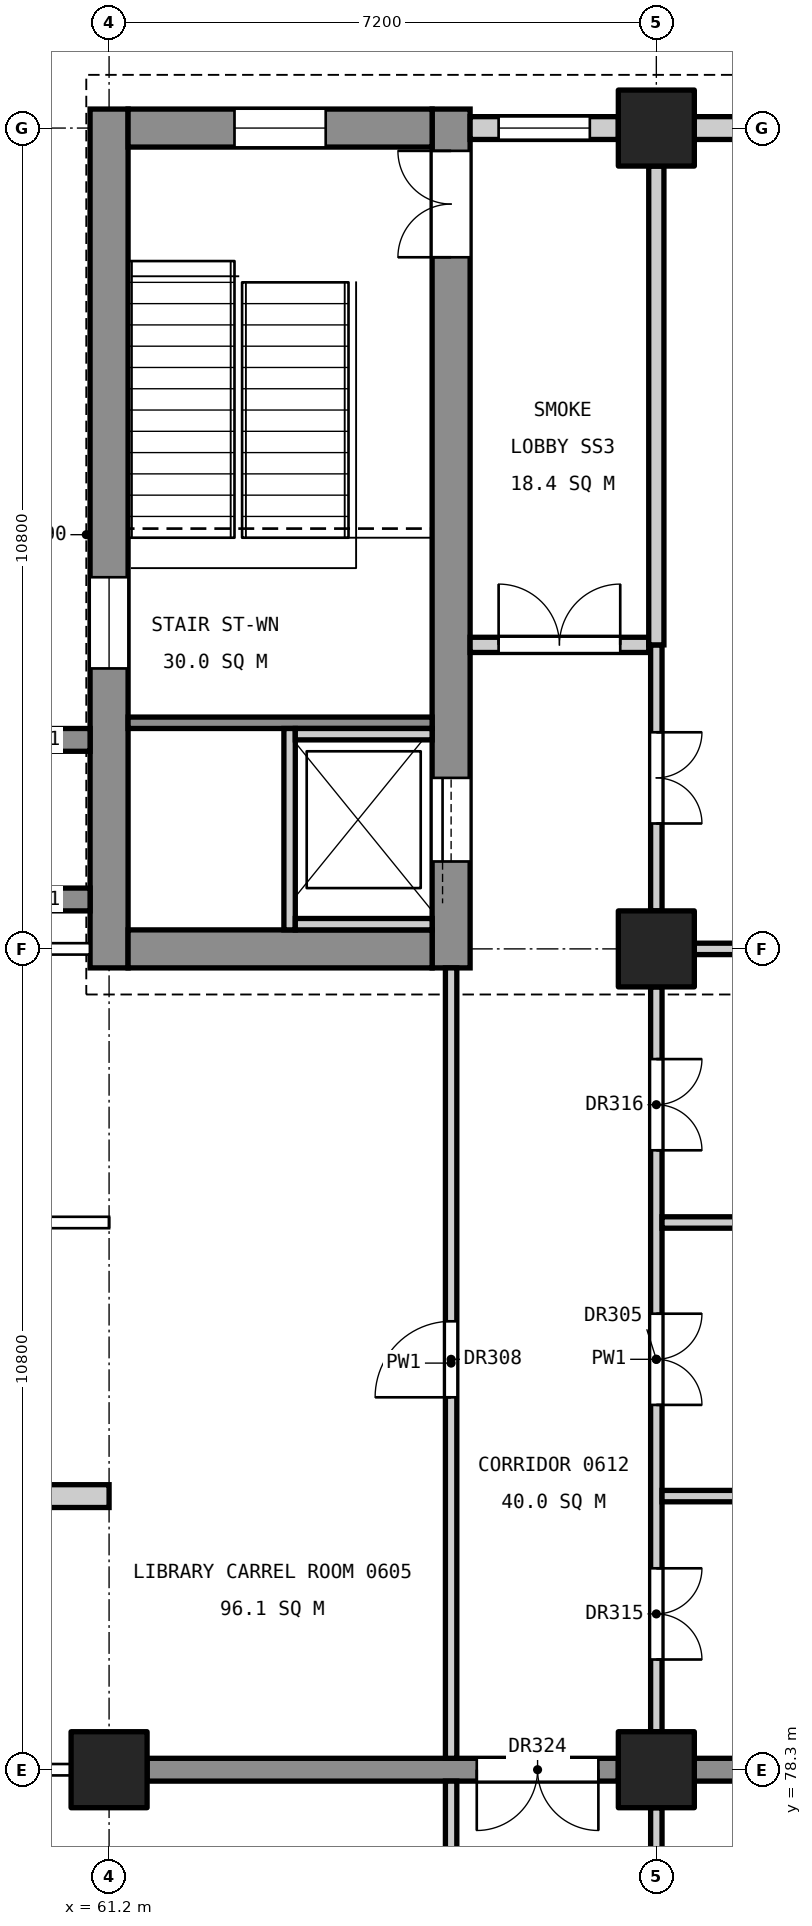
"""IFC4 building model, lengths in metres.
Left out: names, types, materials, properties, quantities, classifications, styles, units other than length and angle.
Written with IfcOpenShell. Run it as: python <this file> out.ifc"""

import sys

from ifc_helpers import new_model, si_unit, direction, frame, frame_2d, origin, origin_2d, place, context, subcontext, project, spatial, rectangle, extrude, element, fill, save


model = new_model("IFC4")
c1 = context("Model", 3, precision=1e-05, world=origin(), true_north=direction((0.0, 1.0)))
c2 = subcontext(c1, "Body", "Model", "MODEL_VIEW")
j1 = project(units=[si_unit("LENGTHUNIT", "METRE"), si_unit("PLANEANGLEUNIT", "RADIAN")], contexts=[c1])
p1 = place(None, origin())
s1 = spatial("IfcSite", under=j1, at=p1, CompositionType="ELEMENT")
p2 = place(p1, origin())
s2 = spatial("IfcBuilding", under=s1, at=p2, CompositionType="ELEMENT")
p3 = place(p2, frame((0.0, 0.0, 31.8)))
s3 = spatial("IfcBuildingStorey", under=s2, at=p3, CompositionType="ELEMENT", Elevation=31.8)
for number, where, z_axis, x_axis in (
    (1, (61.2, 78.3, 0.0), (0.0, 0.0, 1.0), (1.0, 0.0, 0.0)),
    (2, (68.4, 78.3, 0.0), (0.0, 0.0, 1.0), (1.0, 0.0, 0.0)),
    (3, (68.4, 89.1, 0.0), (0.0, 0.0, 1.0), (1.0, 0.0, 0.0)),
    (4, (68.4, 99.9, 0.0), (0.0, 0.0, 1.0), (1.0, 0.0, 0.0)),
):
    element("IfcColumn", number, at=place(p3, frame(where, z_axis=z_axis, x_axis=x_axis)), inside=s3, PredefinedType="COLUMN", context=c2, shape_type="SweptSolid", body=[
        extrude(rectangle(XDim=1.0, YDim=1.0, at=origin_2d()), origin(), (0.0, 0.0, 1.0), 4.8),
    ])
p4 = place(p3, frame((61.2, 88.85, 0.0), z_axis=(0.0, 0.0, 1.0), x_axis=(0.0, 1.0, 0.0)))
e5 = element("IfcWall", 5, at=p4, inside=s3, PredefinedType="SHEAR", context=c2, shape_type="SweptSolid", body=[
    extrude(rectangle(XDim=11.3, YDim=0.5, at=frame_2d((5.65, 0.0))), origin(), (0.0, 0.0, 1.0), 4.55),
])
p5 = place(p4, frame((3.94, 0.0, 3.4)))
e6 = element("IfcOpeningElement", 6, at=p5, cuts=e5, PredefinedType="OPENING", context=c2, shape_type="SweptSolid", body=[
    extrude(rectangle(XDim=1.2, YDim=0.9, at=frame_2d((0.6, 0.45))), frame((0.0, 0.26, 0.0), z_axis=(0.0, -1.0, 0.0), x_axis=(1.0, 0.0, 0.0)), (0.0, 0.0, 1.0), 0.52),
])
p6 = place(p3, frame((65.7, 88.85, 0.0), z_axis=(0.0, 0.0, 1.0), x_axis=(0.0, 1.0, 0.0)))
e7 = element("IfcWall", 7, at=p6, inside=s3, PredefinedType="SHEAR", context=c2, shape_type="SweptSolid", body=[
    extrude(rectangle(XDim=11.3, YDim=0.5, at=frame_2d((5.65, 0.0))), origin(), (0.0, 0.0, 1.0), 4.55),
])
p7 = place(p6, frame((9.35, 0.0, 0.0)))
e8 = element("IfcOpeningElement", 8, at=p7, cuts=e7, PredefinedType="OPENING", context=c2, shape_type="SweptSolid", body=[
    extrude(rectangle(XDim=1.4, YDim=2.1, at=frame_2d((0.7, 1.05))), frame((0.0, 0.26, 0.0), z_axis=(0.0, -1.0, 0.0), x_axis=(1.0, 0.0, 0.0)), (0.0, 0.0, 1.0), 0.52),
])
p8 = place(p6, frame((1.4, 0.0, 0.0)))
e9 = element("IfcOpeningElement", 9, at=p8, cuts=e7, PredefinedType="OPENING", context=c2, shape_type="SweptSolid", body=[
    extrude(rectangle(XDim=1.1, YDim=2.1, at=frame_2d((0.55, 1.05))), frame((0.0, 0.26, 0.0), z_axis=(0.0, -1.0, 0.0), x_axis=(1.0, 0.0, 0.0)), (0.0, 0.0, 1.0), 0.52),
])
p9 = place(p3, frame((61.45, 89.1, 0.0), z_axis=(0.0, 0.0, 1.0), x_axis=(1.0, 0.0, 0.0)))
e10 = element("IfcWall", 10, at=p9, inside=s3, PredefinedType="SHEAR", context=c2, shape_type="SweptSolid", body=[
    extrude(rectangle(XDim=4.0, YDim=0.5, at=frame_2d((2.0, 0.0))), origin(), (0.0, 0.0, 1.0), 4.55),
])
p10 = place(p3, frame((61.45, 99.9, 0.0), z_axis=(0.0, 0.0, 1.0), x_axis=(1.0, 0.0, 0.0)))
e11 = element("IfcWall", 11, at=p10, inside=s3, PredefinedType="SHEAR", context=c2, shape_type="SweptSolid", body=[
    extrude(rectangle(XDim=4.0, YDim=0.5, at=frame_2d((2.0, 0.0))), origin(), (0.0, 0.0, 1.0), 4.55),
])
p11 = place(p10, frame((1.4, 0.0, 3.4)))
e12 = element("IfcOpeningElement", 12, at=p11, cuts=e11, PredefinedType="OPENING", context=c2, shape_type="SweptSolid", body=[
    extrude(rectangle(XDim=1.2, YDim=0.9, at=frame_2d((0.6, 0.45))), frame((0.0, 0.26, 0.0), z_axis=(0.0, -1.0, 0.0), x_axis=(1.0, 0.0, 0.0)), (0.0, 0.0, 1.0), 0.52),
])
for number, where, z_axis, x_axis in (
    (13, (60.95, 89.75, 0.0), (0.0, 0.0, 1.0), (-1.0, 0.0, 0.0)),
    (14, (60.95, 91.85, 0.0), (0.0, 0.0, 1.0), (-1.0, 0.0, 0.0)),
):
    element("IfcWall", number, at=place(p3, frame(where, z_axis=z_axis, x_axis=x_axis)), inside=s3, PredefinedType="SHEAR", context=c2, shape_type="SweptSolid", body=[
        extrude(rectangle(XDim=1.25, YDim=0.3, at=frame_2d((0.625, 0.0))), origin(), (0.0, 0.0, 1.0), 4.8),
    ])
p12 = place(p3, frame((61.7, 78.3, 0.0), z_axis=(0.0, 0.0, 1.0), x_axis=(1.0, 0.0, 0.0)))
e15 = element("IfcWall", 15, at=p12, inside=s3, PredefinedType="SHEAR", context=c2, shape_type="SweptSolid", body=[
    extrude(rectangle(XDim=6.2, YDim=0.3, at=frame_2d((3.1, 0.0))), origin(), (0.0, 0.0, 1.0), 4.55),
])
p13 = place(p12, frame((4.337, 0.0, 0.0)))
e16 = element("IfcOpeningElement", 16, at=p13, cuts=e15, PredefinedType="OPENING", context=c2, shape_type="SweptSolid", body=[
    extrude(rectangle(XDim=1.6, YDim=2.1, at=frame_2d((0.8, 1.05))), frame((0.0, 0.16, 0.0), z_axis=(0.0, -1.0, 0.0), x_axis=(1.0, 0.0, 0.0)), (0.0, 0.0, 1.0), 0.32),
])
p14 = place(p3, frame((68.9, 78.3, 0.0), z_axis=(0.0, 0.0, 1.0), x_axis=(1.0, 0.0, 0.0)))
e17 = element("IfcWall", 17, at=p14, inside=s3, PredefinedType="SHEAR", context=c2, shape_type="SweptSolid", body=[
    extrude(rectangle(XDim=9.8, YDim=0.3, at=frame_2d((4.9, 0.0))), origin(), (0.0, 0.0, 1.0), 4.55),
])
p15 = place(p3, frame((61.45, 92.075, 0.0), z_axis=(0.0, 0.0, 1.0), x_axis=(1.0, 0.0, 0.0)))
e18 = element("IfcWall", 18, at=p15, inside=s3, PredefinedType="SOLIDWALL", context=c2, shape_type="SweptSolid", body=[
    extrude(rectangle(XDim=4.0, YDim=0.15, at=frame_2d((2.0, 0.0))), origin(), (0.0, 0.0, 1.0), 4.55),
])
p16 = place(p3, frame((63.575, 92.0, 0.0), z_axis=(0.0, 0.0, 1.0), x_axis=(0.0, -1.0, 0.0)))
e19 = element("IfcWall", 19, at=p16, inside=s3, PredefinedType="SOLIDWALL", context=c2, shape_type="SweptSolid", body=[
    extrude(rectangle(XDim=2.65, YDim=0.15, at=frame_2d((1.325, 0.0))), origin(), (0.0, 0.0, 1.0), 4.8),
])
for number, where, z_axis, x_axis in (
    (20, (63.65, 91.925, 0.0), (0.0, 0.0, 1.0), (1.0, 0.0, 0.0)),
    (21, (63.65, 89.425, 0.0), (0.0, 0.0, 1.0), (1.0, 0.0, 0.0)),
):
    element("IfcWall", number, at=place(p3, frame(where, z_axis=z_axis, x_axis=x_axis)), inside=s3, PredefinedType="SOLIDWALL", context=c2, shape_type="SweptSolid", body=[
        extrude(rectangle(XDim=1.8, YDim=0.15, at=frame_2d((0.9, 0.0))), origin(), (0.0, 0.0, 1.0), 4.8),
    ])
p17 = place(p3, frame((65.95, 99.9, 0.0), z_axis=(0.0, 0.0, 1.0), x_axis=(1.0, 0.0, 0.0)))
e22 = element("IfcWall", 22, at=p17, inside=s3, PredefinedType="STANDARD", context=c2, shape_type="SweptSolid", body=[
    extrude(rectangle(XDim=1.95, YDim=0.3, at=frame_2d((0.975, 0.0))), origin(), (0.0, 0.0, 1.0), 3.85),
])
p18 = place(p17, frame((0.375, 0.0, 0.9)))
e23 = element("IfcOpeningElement", 23, at=p18, cuts=e22, PredefinedType="OPENING", context=c2, shape_type="SweptSolid", body=[
    extrude(rectangle(XDim=1.2, YDim=2.4, at=frame_2d((0.6, 1.2))), frame((0.0, 0.16, 0.0), z_axis=(0.0, -1.0, 0.0), x_axis=(1.0, 0.0, 0.0)), (0.0, 0.0, 1.0), 0.32),
])
p19 = place(p3, frame((68.9, 99.9, 0.0), z_axis=(0.0, 0.0, 1.0), x_axis=(1.0, 0.0, 0.0)))
e24 = element("IfcWall", 24, at=p19, inside=s3, PredefinedType="STANDARD", context=c2, shape_type="SweptSolid", body=[
    extrude(rectangle(XDim=9.8, YDim=0.3, at=frame_2d((4.9, 0.0))), origin(), (0.0, 0.0, 1.0), 3.85),
])
p20 = place(p19, frame((0.65, 0.0, 0.9)))
e25 = element("IfcOpeningElement", 25, at=p20, cuts=e24, PredefinedType="OPENING", context=c2, shape_type="SweptSolid", body=[
    extrude(rectangle(XDim=1.8, YDim=2.4, at=frame_2d((0.9, 1.2))), frame((0.0, 0.16, 0.0), z_axis=(0.0, -1.0, 0.0), x_axis=(1.0, 0.0, 0.0)), (0.0, 0.0, 1.0), 0.32),
])
p21 = place(p19, frame((4.525, 0.0, 0.8)))
e26 = element("IfcOpeningElement", 26, at=p21, cuts=e24, PredefinedType="OPENING", context=c2, shape_type="SweptSolid", body=[
    extrude(rectangle(XDim=0.75, YDim=1.2, at=frame_2d((0.375, 0.6))), frame((0.0, 0.16, 0.0), z_axis=(0.0, -1.0, 0.0), x_axis=(1.0, 0.0, 0.0)), (0.0, 0.0, 1.0), 0.32),
])
p22 = place(p19, frame((7.35, 0.0, 0.9)))
e27 = element("IfcOpeningElement", 27, at=p22, cuts=e24, PredefinedType="OPENING", context=c2, shape_type="SweptSolid", body=[
    extrude(rectangle(XDim=1.8, YDim=2.4, at=frame_2d((0.9, 1.2))), frame((0.0, 0.16, 0.0), z_axis=(0.0, -1.0, 0.0), x_axis=(1.0, 0.0, 0.0)), (0.0, 0.0, 1.0), 0.32),
])
p23 = place(p3, frame((56.4, 81.9, 0.0), z_axis=(0.0, 0.0, 1.0), x_axis=(1.0, 0.0, 0.0)))
e28 = element("IfcWall", 28, at=p23, inside=s3, PredefinedType="STANDARD", context=c2, shape_type="SweptSolid", body=[
    extrude(rectangle(XDim=4.8, YDim=0.3, at=frame_2d((2.4, 0.0))), origin(), (0.0, 0.0, 1.0), 3.65),
])
p24 = place(p3, frame((65.7, 74.95, 0.0), z_axis=(0.0, 0.0, 1.0), x_axis=(0.0, 1.0, 0.0)))
e29 = element("IfcWall", 29, at=p24, inside=s3, PredefinedType="PARTITIONING", context=c2, shape_type="SweptSolid", body=[
    extrude(rectangle(XDim=3.2, YDim=0.15, at=frame_2d((1.6, 0.0))), origin(), (0.0, 0.0, 1.0), 3.55),
])
p25 = place(p24, frame((1.05, 0.0, 0.0)))
e30 = element("IfcOpeningElement", 30, at=p25, cuts=e29, PredefinedType="OPENING", context=c2, shape_type="SweptSolid", body=[
    extrude(rectangle(XDim=1.0, YDim=2.1, at=frame_2d((0.5, 1.05))), frame((0.0, 0.085, 0.0), z_axis=(0.0, -1.0, 0.0), x_axis=(1.0, 0.0, 0.0)), (0.0, 0.0, 1.0), 0.17),
])
p26 = place(p3, frame((65.7, 78.45, 0.0), z_axis=(0.0, 0.0, 1.0), x_axis=(0.0, 1.0, 0.0)))
e31 = element("IfcWall", 31, at=p26, inside=s3, PredefinedType="PARTITIONING", context=c2, shape_type="SweptSolid", body=[
    extrude(rectangle(XDim=10.4, YDim=0.15, at=frame_2d((5.2, 0.0))), origin(), (0.0, 0.0, 1.0), 3.55),
])
p27 = place(p26, frame((4.75, 0.0, 0.0)))
e32 = element("IfcOpeningElement", 32, at=p27, cuts=e31, PredefinedType="OPENING", context=c2, shape_type="SweptSolid", body=[
    extrude(rectangle(XDim=1.0, YDim=2.1, at=frame_2d((0.5, 1.05))), frame((0.0, 0.085, 0.0), z_axis=(0.0, -1.0, 0.0), x_axis=(1.0, 0.0, 0.0)), (0.0, 0.0, 1.0), 0.17),
])
p28 = place(p3, frame((65.95, 93.1, 0.0), z_axis=(0.0, 0.0, 1.0), x_axis=(1.0, 0.0, 0.0)))
e33 = element("IfcWall", 33, at=p28, inside=s3, PredefinedType="PARTITIONING", context=c2, shape_type="SweptSolid", body=[
    extrude(rectangle(XDim=2.35, YDim=0.2, at=frame_2d((1.175, 0.0))), origin(), (0.0, 0.0, 1.0), 3.55),
])
p29 = place(p28, frame((0.375, 0.0, 0.0)))
e34 = element("IfcOpeningElement", 34, at=p29, cuts=e33, PredefinedType="OPENING", context=c2, shape_type="SweptSolid", body=[
    extrude(rectangle(XDim=1.6, YDim=2.1, at=frame_2d((0.8, 1.05))), frame((0.0, 0.11, 0.0), z_axis=(0.0, -1.0, 0.0), x_axis=(1.0, 0.0, 0.0)), (0.0, 0.0, 1.0), 0.22),
])
p30 = place(p3, frame((68.4, 78.8, 0.0), z_axis=(0.0, 0.0, 1.0), x_axis=(0.0, 1.0, 0.0)))
e35 = element("IfcWall", 35, at=p30, inside=s3, PredefinedType="PARTITIONING", context=c2, shape_type="SweptSolid", body=[
    extrude(rectangle(XDim=9.8, YDim=0.15, at=frame_2d((4.9, 0.0))), origin(), (0.0, 0.0, 1.0), 3.55),
])
p31 = place(p30, frame((4.3, 0.0, 0.0)))
e36 = element("IfcOpeningElement", 36, at=p31, cuts=e35, PredefinedType="OPENING", context=c2, shape_type="SweptSolid", body=[
    extrude(rectangle(XDim=1.2, YDim=2.1, at=frame_2d((0.6, 1.05))), frame((0.0, 0.085, 0.0), z_axis=(0.0, -1.0, 0.0), x_axis=(1.0, 0.0, 0.0)), (0.0, 0.0, 1.0), 0.17),
])
p32 = place(p30, frame((0.95, 0.0, 0.0)))
e37 = element("IfcOpeningElement", 37, at=p32, cuts=e35, PredefinedType="OPENING", context=c2, shape_type="SweptSolid", body=[
    extrude(rectangle(XDim=1.2, YDim=2.1, at=frame_2d((0.6, 1.05))), frame((0.0, 0.085, 0.0), z_axis=(0.0, -1.0, 0.0), x_axis=(1.0, 0.0, 0.0)), (0.0, 0.0, 1.0), 0.17),
])
p33 = place(p30, frame((7.65, 0.0, 0.0)))
e38 = element("IfcOpeningElement", 38, at=p33, cuts=e35, PredefinedType="OPENING", context=c2, shape_type="SweptSolid", body=[
    extrude(rectangle(XDim=1.2, YDim=2.1, at=frame_2d((0.6, 1.05))), frame((0.0, 0.085, 0.0), z_axis=(0.0, -1.0, 0.0), x_axis=(1.0, 0.0, 0.0)), (0.0, 0.0, 1.0), 0.17),
])
p34 = place(p3, frame((68.4, 89.6, 0.0), z_axis=(0.0, 0.0, 1.0), x_axis=(0.0, 1.0, 0.0)))
e39 = element("IfcWall", 39, at=p34, inside=s3, PredefinedType="PARTITIONING", context=c2, shape_type="SweptSolid", body=[
    extrude(rectangle(XDim=3.5, YDim=0.15, at=frame_2d((1.75, 0.0))), origin(), (0.0, 0.0, 1.0), 3.55),
])
p35 = place(p34, frame((1.15, 0.0, 0.0)))
e40 = element("IfcOpeningElement", 40, at=p35, cuts=e39, PredefinedType="OPENING", context=c2, shape_type="SweptSolid", body=[
    extrude(rectangle(XDim=1.2, YDim=2.1, at=frame_2d((0.6, 1.05))), frame((0.0, 0.085, 0.0), z_axis=(0.0, -1.0, 0.0), x_axis=(1.0, 0.0, 0.0)), (0.0, 0.0, 1.0), 0.17),
])
p36 = place(p3, frame((68.4, 93.1, 0.0), z_axis=(0.0, 0.0, 1.0), x_axis=(0.0, 1.0, 0.0)))
e41 = element("IfcWall", 41, at=p36, inside=s3, PredefinedType="PARTITIONING", context=c2, shape_type="SweptSolid", body=[
    extrude(rectangle(XDim=6.3, YDim=0.2, at=frame_2d((3.15, 0.0))), origin(), (0.0, 0.0, 1.0), 3.55),
])
p37 = place(p3, frame((68.4, 72.65, 0.0), z_axis=(0.0, 0.0, 1.0), x_axis=(0.0, 1.0, 0.0)))
e42 = element("IfcWall", 42, at=p37, inside=s3, PredefinedType="PARTITIONING", context=c2, shape_type="SweptSolid", body=[
    extrude(rectangle(XDim=5.15, YDim=0.15, at=frame_2d((2.575, 0.0))), origin(), (0.0, 0.0, 1.0), 3.55),
])
p38 = place(p37, frame((0.425, 0.0, 0.0)))
e43 = element("IfcOpeningElement", 43, at=p38, cuts=e42, PredefinedType="OPENING", context=c2, shape_type="SweptSolid", body=[
    extrude(rectangle(XDim=1.2, YDim=2.1, at=frame_2d((0.6, 1.05))), frame((0.0, 0.085, 0.0), z_axis=(0.0, -1.0, 0.0), x_axis=(1.0, 0.0, 0.0)), (0.0, 0.0, 1.0), 0.17),
])
p39 = place(p37, frame((3.0, 0.0, 0.0)))
e44 = element("IfcOpeningElement", 44, at=p39, cuts=e42, PredefinedType="OPENING", context=c2, shape_type="SweptSolid", body=[
    extrude(rectangle(XDim=1.2, YDim=2.1, at=frame_2d((0.6, 1.05))), frame((0.0, 0.085, 0.0), z_axis=(0.0, -1.0, 0.0), x_axis=(1.0, 0.0, 0.0)), (0.0, 0.0, 1.0), 0.17),
])
for number, where, z_axis, x_axis in (
    (45, (68.475, 81.9, 0.0), (0.0, 0.0, 1.0), (1.0, 0.0, 0.0)),
    (46, (68.475, 85.5, 0.0), (0.0, 0.0, 1.0), (1.0, 0.0, 0.0)),
):
    element("IfcWall", number, at=place(p3, frame(where, z_axis=z_axis, x_axis=x_axis)), inside=s3, PredefinedType="PARTITIONING", context=c2, shape_type="SweptSolid", body=[
        extrude(rectangle(XDim=10.575, YDim=0.15, at=frame_2d((5.288, 0.0))), origin(), (0.0, 0.0, 1.0), 3.85),
    ])
p40 = place(p3, frame((68.9, 89.1, 0.0), z_axis=(0.0, 0.0, 1.0), x_axis=(1.0, 0.0, 0.0)))
e47 = element("IfcWall", 47, at=p40, inside=s3, PredefinedType="PARTITIONING", context=c2, shape_type="SweptSolid", body=[
    extrude(rectangle(XDim=9.8, YDim=0.15, at=frame_2d((4.9, 0.0))), origin(), (0.0, 0.0, 1.0), 3.85),
])
p41 = place(p7, origin())
e48 = element("IfcDoor", 48, at=p41, inside=s3, OperationType="DOUBLE_DOOR_SINGLE_SWING", PredefinedType="DOOR", context=c2, shape_type="SweptSolid", body=[
    extrude(rectangle(XDim=1.4, YDim=2.1, at=frame_2d((0.7, 1.05))), frame((0.0, 0.025, 0.0), z_axis=(0.0, -1.0, 0.0), x_axis=(1.0, 0.0, 0.0)), (0.0, 0.0, 1.0), 0.05),
])
fill(e8, e48)
p42 = place(p8, origin())
e49 = element("IfcDoor", 49, at=p42, inside=s3, OperationType="SLIDING_TO_LEFT", PredefinedType="DOOR", context=c2, shape_type="SweptSolid", body=[
    extrude(rectangle(XDim=1.1, YDim=2.1, at=frame_2d((0.55, 1.05))), frame((0.0, 0.025, 0.0), z_axis=(0.0, -1.0, 0.0), x_axis=(1.0, 0.0, 0.0)), (0.0, 0.0, 1.0), 0.05),
])
fill(e9, e49)
p43 = place(p18, origin())
e50 = element("IfcWindow", 50, at=p43, inside=s3, PartitioningType="SINGLE_PANEL", PredefinedType="WINDOW", context=c2, shape_type="SweptSolid", body=[
    extrude(rectangle(XDim=1.2, YDim=2.4, at=frame_2d((0.6, 1.2))), frame((0.0, 0.03, 0.0), z_axis=(0.0, -1.0, 0.0), x_axis=(1.0, 0.0, 0.0)), (0.0, 0.0, 1.0), 0.06),
])
fill(e23, e50)
p44 = place(p5, origin())
e51 = element("IfcWindow", 51, at=p44, inside=s3, PartitioningType="SINGLE_PANEL", PredefinedType="WINDOW", context=c2, shape_type="SweptSolid", body=[
    extrude(rectangle(XDim=1.2, YDim=0.9, at=frame_2d((0.6, 0.45))), frame((0.0, 0.03, 0.0), z_axis=(0.0, -1.0, 0.0), x_axis=(1.0, 0.0, 0.0)), (0.0, 0.0, 1.0), 0.06),
])
fill(e6, e51)
p45 = place(p11, origin())
e52 = element("IfcWindow", 52, at=p45, inside=s3, PartitioningType="SINGLE_PANEL", PredefinedType="WINDOW", context=c2, shape_type="SweptSolid", body=[
    extrude(rectangle(XDim=1.2, YDim=0.9, at=frame_2d((0.6, 0.45))), frame((0.0, 0.03, 0.0), z_axis=(0.0, -1.0, 0.0), x_axis=(1.0, 0.0, 0.0)), (0.0, 0.0, 1.0), 0.06),
])
fill(e12, e52)
p46 = place(p31, frame((1.2, 0.0, 0.0), z_axis=(0.0, 0.0, 1.0), x_axis=(-1.0, 0.0, 0.0)))
e53 = element("IfcDoor", 53, at=p46, inside=s3, OperationType="DOUBLE_DOOR_SINGLE_SWING", PredefinedType="DOOR", context=c2, shape_type="SweptSolid", body=[
    extrude(rectangle(XDim=1.2, YDim=2.1, at=frame_2d((0.6, 1.05))), frame((0.0, 0.025, 0.0), z_axis=(0.0, -1.0, 0.0), x_axis=(1.0, 0.0, 0.0)), (0.0, 0.0, 1.0), 0.05),
])
fill(e36, e53)
p47 = place(p35, frame((1.2, 0.0, 0.0), z_axis=(0.0, 0.0, 1.0), x_axis=(-1.0, 0.0, 0.0)))
e54 = element("IfcDoor", 54, at=p47, inside=s3, OperationType="DOUBLE_DOOR_SINGLE_SWING", PredefinedType="DOOR", context=c2, shape_type="SweptSolid", body=[
    extrude(rectangle(XDim=1.2, YDim=2.1, at=frame_2d((0.6, 1.05))), frame((0.0, 0.025, 0.0), z_axis=(0.0, -1.0, 0.0), x_axis=(1.0, 0.0, 0.0)), (0.0, 0.0, 1.0), 0.05),
])
fill(e40, e54)
p48 = place(p27, origin())
e55 = element("IfcDoor", 55, at=p48, inside=s3, OperationType="SINGLE_SWING_LEFT", PredefinedType="DOOR", context=c2, shape_type="SweptSolid", body=[
    extrude(rectangle(XDim=1.0, YDim=2.1, at=frame_2d((0.5, 1.05))), frame((0.0, 0.025, 0.0), z_axis=(0.0, -1.0, 0.0), x_axis=(1.0, 0.0, 0.0)), (0.0, 0.0, 1.0), 0.05),
])
fill(e32, e55)
p49 = place(p32, frame((1.2, 0.0, 0.0), z_axis=(0.0, 0.0, 1.0), x_axis=(-1.0, 0.0, 0.0)))
e56 = element("IfcDoor", 56, at=p49, inside=s3, OperationType="DOUBLE_DOOR_SINGLE_SWING", PredefinedType="DOOR", context=c2, shape_type="SweptSolid", body=[
    extrude(rectangle(XDim=1.2, YDim=2.1, at=frame_2d((0.6, 1.05))), frame((0.0, 0.025, 0.0), z_axis=(0.0, -1.0, 0.0), x_axis=(1.0, 0.0, 0.0)), (0.0, 0.0, 1.0), 0.05),
])
fill(e37, e56)
p50 = place(p33, frame((1.2, 0.0, 0.0), z_axis=(0.0, 0.0, 1.0), x_axis=(-1.0, 0.0, 0.0)))
e57 = element("IfcDoor", 57, at=p50, inside=s3, OperationType="DOUBLE_DOOR_SINGLE_SWING", PredefinedType="DOOR", context=c2, shape_type="SweptSolid", body=[
    extrude(rectangle(XDim=1.2, YDim=2.1, at=frame_2d((0.6, 1.05))), frame((0.0, 0.025, 0.0), z_axis=(0.0, -1.0, 0.0), x_axis=(1.0, 0.0, 0.0)), (0.0, 0.0, 1.0), 0.05),
])
fill(e38, e57)
p51 = place(p29, origin())
e58 = element("IfcDoor", 58, at=p51, inside=s3, OperationType="DOUBLE_DOOR_SINGLE_SWING", PredefinedType="DOOR", context=c2, shape_type="SweptSolid", body=[
    extrude(rectangle(XDim=1.6, YDim=2.1, at=frame_2d((0.8, 1.05))), frame((0.0, 0.025, 0.0), z_axis=(0.0, -1.0, 0.0), x_axis=(1.0, 0.0, 0.0)), (0.0, 0.0, 1.0), 0.05),
])
fill(e34, e58)
p52 = place(p13, frame((1.6, 0.0, 0.0), z_axis=(0.0, 0.0, 1.0), x_axis=(-1.0, 0.0, 0.0)))
e59 = element("IfcDoor", 59, at=p52, inside=s3, OperationType="DOUBLE_DOOR_SINGLE_SWING", PredefinedType="DOOR", context=c2, shape_type="SweptSolid", body=[
    extrude(rectangle(XDim=1.6, YDim=2.1, at=frame_2d((0.8, 1.05))), frame((0.0, 0.025, 0.0), z_axis=(0.0, -1.0, 0.0), x_axis=(1.0, 0.0, 0.0)), (0.0, 0.0, 1.0), 0.05),
])
fill(e16, e59)
save(model, sys.argv[1])
